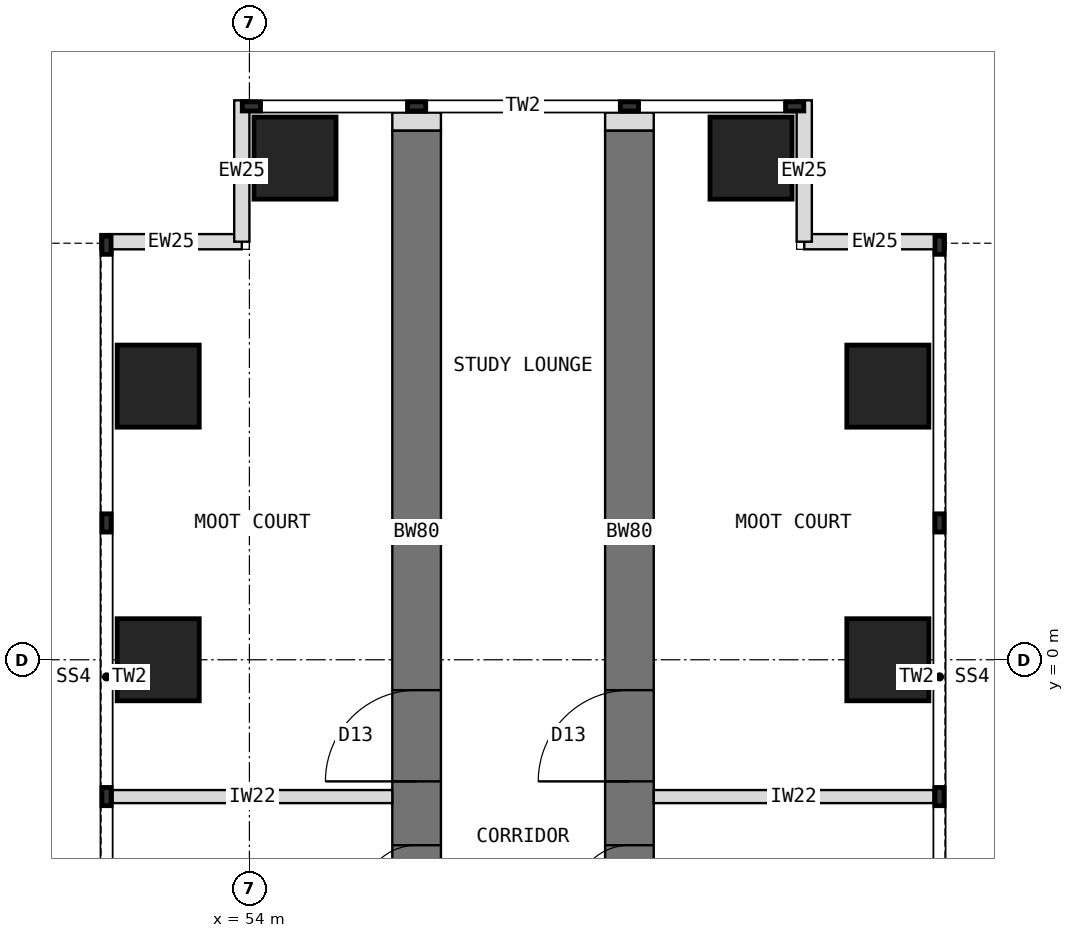
"""IFC4 building model, lengths in metres.
Left out: names, types, materials, properties, quantities, classifications, styles, units other than length and angle.
Written with IfcOpenShell. Run it as: python <this file> out.ifc"""

import sys

from ifc_helpers import new_model, si_unit, direction, frame, frame_2d, origin, origin_2d, place, context, subcontext, project, spatial, rectangle, extrude, element, fill, save


model = new_model("IFC4")
c1 = context("Model", 3, precision=1e-05, world=origin(), true_north=direction((0.0, 1.0)))
c2 = subcontext(c1, "Body", "Model", "MODEL_VIEW")
j1 = project(units=[si_unit("LENGTHUNIT", "METRE"), si_unit("PLANEANGLEUNIT", "RADIAN")], contexts=[c1])
p1 = place(None, origin())
s1 = spatial("IfcSite", under=j1, at=p1, CompositionType="ELEMENT")
p2 = place(p1, origin())
s2 = spatial("IfcBuilding", under=s1, at=p2, CompositionType="ELEMENT")
p3 = place(p2, frame((0.0, 0.0, 101.5)))
s3 = spatial("IfcBuildingStorey", under=s2, at=p3, CompositionType="ELEMENT", Elevation=101.5)
p4 = place(p3, frame((56.75, -4.5, 0.0), z_axis=(0.0, 0.0, 1.0), x_axis=(0.0, 1.0, 0.0)))
e1 = element("IfcWall", 1, at=p4, inside=s3, PredefinedType="SHEAR", context=c2, shape_type="SweptSolid", body=[
    extrude(rectangle(XDim=13.2, YDim=0.8, at=frame_2d((6.6, 0.0))), origin(), (0.0, 0.0, 1.0), 4.0),
])
p5 = place(p4, frame((0.55, 0.0, 0.0)))
e2 = element("IfcOpeningElement", 2, at=p5, cuts=e1, PredefinedType="OPENING", context=c2, shape_type="SweptSolid", body=[
    extrude(rectangle(XDim=0.9, YDim=2.1, at=frame_2d((0.45, 1.05))), frame((0.0, 0.41, 0.0), z_axis=(0.0, -1.0, 0.0), x_axis=(1.0, 0.0, 0.0)), (0.0, 0.0, 1.0), 0.82),
])
p6 = place(p4, frame((2.5, 0.0, 0.0)))
e3 = element("IfcOpeningElement", 3, at=p6, cuts=e1, PredefinedType="OPENING", context=c2, shape_type="SweptSolid", body=[
    extrude(rectangle(XDim=1.5, YDim=2.1, at=frame_2d((0.75, 1.05))), frame((0.0, 0.41, 0.0), z_axis=(0.0, -1.0, 0.0), x_axis=(1.0, 0.0, 0.0)), (0.0, 0.0, 1.0), 0.82),
])
p7 = place(p3, frame((60.25, -4.5, 0.0), z_axis=(0.0, 0.0, 1.0), x_axis=(0.0, 1.0, 0.0)))
e4 = element("IfcWall", 4, at=p7, inside=s3, PredefinedType="SHEAR", context=c2, shape_type="SweptSolid", body=[
    extrude(rectangle(XDim=13.2, YDim=0.8, at=frame_2d((6.6, 0.0))), origin(), (0.0, 0.0, 1.0), 4.0),
])
p8 = place(p7, frame((0.55, 0.0, 0.0)))
e5 = element("IfcOpeningElement", 5, at=p8, cuts=e4, PredefinedType="OPENING", context=c2, shape_type="SweptSolid", body=[
    extrude(rectangle(XDim=0.9, YDim=2.1, at=frame_2d((0.45, 1.05))), frame((0.0, 0.41, 0.0), z_axis=(0.0, -1.0, 0.0), x_axis=(1.0, 0.0, 0.0)), (0.0, 0.0, 1.0), 0.82),
])
p9 = place(p7, frame((2.5, 0.0, 0.0)))
e6 = element("IfcOpeningElement", 6, at=p9, cuts=e4, PredefinedType="OPENING", context=c2, shape_type="SweptSolid", body=[
    extrude(rectangle(XDim=1.5, YDim=2.1, at=frame_2d((0.75, 1.05))), frame((0.0, 0.41, 0.0), z_axis=(0.0, -1.0, 0.0), x_axis=(1.0, 0.0, 0.0)), (0.0, 0.0, 1.0), 0.82),
])
for number, where, z_axis, x_axis in (
    (7, (52.5, 0.0, 0.0), (0.0, 0.0, 1.0), (1.0, 0.0, 0.0)),
    (8, (64.5, 0.0, 0.0), (0.0, 0.0, 1.0), (1.0, 0.0, 0.0)),
    (9, (52.5, 4.5, 0.0), (0.0, 0.0, 1.0), (1.0, 0.0, 0.0)),
    (10, (64.5, 4.5, 0.0), (0.0, 0.0, 1.0), (1.0, 0.0, 0.0)),
    (11, (54.75, 8.25, 0.0), (0.0, 0.0, 1.0), (1.0, 0.0, 0.0)),
    (12, (62.25, 8.25, 0.0), (0.0, 0.0, 1.0), (1.0, 0.0, 0.0)),
):
    element("IfcColumn", number, at=place(p3, frame(where, z_axis=z_axis, x_axis=x_axis)), inside=s3, PredefinedType="COLUMN", context=c2, shape_type="SweptSolid", body=[
        extrude(rectangle(XDim=1.35, YDim=1.35, at=origin_2d()), origin(), (0.0, 0.0, 1.0), 4.0),
    ])
for number, where, z_axis, x_axis in (
    (13, (51.55, 6.875, 0.0), (0.0, 0.0, 1.0), (1.0, 0.0, 0.0)),
    (14, (53.875, 6.875, 0.0), (0.0, 0.0, 1.0), (0.0, 1.0, 0.0)),
    (15, (65.45, 6.875, 0.0), (0.0, 0.0, 1.0), (-1.0, 0.0, 0.0)),
    (16, (63.125, 6.875, 0.0), (0.0, 0.0, 1.0), (0.0, 1.0, 0.0)),
):
    element("IfcWall", number, at=place(p3, frame(where, z_axis=z_axis, x_axis=x_axis)), inside=s3, PredefinedType="STANDARD", context=c2, shape_type="SweptSolid", body=[
        extrude(rectangle(XDim=2.325, YDim=0.25, at=frame_2d((1.163, 0.0))), origin(), (0.0, 0.0, 1.0), 3.8),
    ])
for number, where, z_axis, x_axis in (
    (17, (56.75, 8.7, 0.0), (0.0, 0.0, 1.0), (0.0, 1.0, 0.0)),
    (18, (60.25, 8.7, 0.0), (0.0, 0.0, 1.0), (0.0, 1.0, 0.0)),
):
    element("IfcWall", number, at=place(p3, frame(where, z_axis=z_axis, x_axis=x_axis)), inside=s3, PredefinedType="PARTITIONING", context=c2, shape_type="SweptSolid", body=[
        extrude(rectangle(XDim=0.3, YDim=0.8, at=frame_2d((0.15, 0.0))), origin(), (0.0, 0.0, 1.0), 3.8),
    ])
for number, where, z_axis, x_axis in (
    (19, (56.35, -2.25, 0.0), (0.0, 0.0, 1.0), (-1.0, 0.0, 0.0)),
    (20, (60.65, -2.25, 0.0), (0.0, 0.0, 1.0), (1.0, 0.0, 0.0)),
):
    element("IfcWall", number, at=place(p3, frame(where, z_axis=z_axis, x_axis=x_axis)), inside=s3, PredefinedType="PARTITIONING", context=c2, shape_type="SweptSolid", body=[
        extrude(rectangle(XDim=4.6, YDim=0.215, at=frame_2d((2.3, 0.0))), origin(), (0.0, 0.0, 1.0), 3.8),
    ])
p10 = place(p5, origin())
e21 = element("IfcDoor", 21, at=p10, inside=s3, OperationType="SINGLE_SWING_LEFT", PredefinedType="DOOR", context=c2, shape_type="SweptSolid", body=[
    extrude(rectangle(XDim=0.82, YDim=2.06, at=frame_2d((0.45, 1.03))), frame((0.0, 0.025, 0.0), z_axis=(0.0, -1.0, 0.0), x_axis=(1.0, 0.0, 0.0)), (0.0, 0.0, 1.0), 0.05),
    extrude(rectangle(XDim=0.04, YDim=2.1, at=frame_2d((0.02, 1.05))), frame((0.0, 0.4, 0.0), z_axis=(0.0, -1.0, 0.0), x_axis=(1.0, 0.0, 0.0)), (0.0, 0.0, 1.0), 0.8),
    extrude(rectangle(XDim=0.04, YDim=2.1, at=frame_2d((0.88, 1.05))), frame((0.0, 0.4, 0.0), z_axis=(0.0, -1.0, 0.0), x_axis=(1.0, 0.0, 0.0)), (0.0, 0.0, 1.0), 0.8),
    extrude(rectangle(XDim=0.82, YDim=0.04, at=frame_2d((0.45, 2.08))), frame((0.0, 0.4, 0.0), z_axis=(0.0, -1.0, 0.0), x_axis=(1.0, 0.0, 0.0)), (0.0, 0.0, 1.0), 0.8),
])
fill(e2, e21)
p11 = place(p6, origin())
e22 = element("IfcDoor", 22, at=p11, inside=s3, OperationType="DOUBLE_DOOR_SINGLE_SWING", PredefinedType="DOOR", context=c2, shape_type="SweptSolid", body=[
    extrude(rectangle(XDim=1.42, YDim=2.06, at=frame_2d((0.75, 1.03))), frame((0.0, 0.025, 0.0), z_axis=(0.0, -1.0, 0.0), x_axis=(1.0, 0.0, 0.0)), (0.0, 0.0, 1.0), 0.05),
    extrude(rectangle(XDim=0.04, YDim=2.1, at=frame_2d((0.02, 1.05))), frame((0.0, 0.4, 0.0), z_axis=(0.0, -1.0, 0.0), x_axis=(1.0, 0.0, 0.0)), (0.0, 0.0, 1.0), 0.8),
    extrude(rectangle(XDim=0.04, YDim=2.1, at=frame_2d((1.48, 1.05))), frame((0.0, 0.4, 0.0), z_axis=(0.0, -1.0, 0.0), x_axis=(1.0, 0.0, 0.0)), (0.0, 0.0, 1.0), 0.8),
    extrude(rectangle(XDim=1.42, YDim=0.04, at=frame_2d((0.75, 2.08))), frame((0.0, 0.4, 0.0), z_axis=(0.0, -1.0, 0.0), x_axis=(1.0, 0.0, 0.0)), (0.0, 0.0, 1.0), 0.8),
])
fill(e3, e22)
p12 = place(p8, origin())
e23 = element("IfcDoor", 23, at=p12, inside=s3, OperationType="SINGLE_SWING_LEFT", PredefinedType="DOOR", context=c2, shape_type="SweptSolid", body=[
    extrude(rectangle(XDim=0.82, YDim=2.06, at=frame_2d((0.45, 1.03))), frame((0.0, 0.025, 0.0), z_axis=(0.0, -1.0, 0.0), x_axis=(1.0, 0.0, 0.0)), (0.0, 0.0, 1.0), 0.05),
    extrude(rectangle(XDim=0.04, YDim=2.1, at=frame_2d((0.02, 1.05))), frame((0.0, 0.4, 0.0), z_axis=(0.0, -1.0, 0.0), x_axis=(1.0, 0.0, 0.0)), (0.0, 0.0, 1.0), 0.8),
    extrude(rectangle(XDim=0.04, YDim=2.1, at=frame_2d((0.88, 1.05))), frame((0.0, 0.4, 0.0), z_axis=(0.0, -1.0, 0.0), x_axis=(1.0, 0.0, 0.0)), (0.0, 0.0, 1.0), 0.8),
    extrude(rectangle(XDim=0.82, YDim=0.04, at=frame_2d((0.45, 2.08))), frame((0.0, 0.4, 0.0), z_axis=(0.0, -1.0, 0.0), x_axis=(1.0, 0.0, 0.0)), (0.0, 0.0, 1.0), 0.8),
])
fill(e5, e23)
p13 = place(p9, origin())
e24 = element("IfcDoor", 24, at=p13, inside=s3, OperationType="DOUBLE_DOOR_SINGLE_SWING", PredefinedType="DOOR", context=c2, shape_type="SweptSolid", body=[
    extrude(rectangle(XDim=1.42, YDim=2.06, at=frame_2d((0.75, 1.03))), frame((0.0, 0.025, 0.0), z_axis=(0.0, -1.0, 0.0), x_axis=(1.0, 0.0, 0.0)), (0.0, 0.0, 1.0), 0.05),
    extrude(rectangle(XDim=0.04, YDim=2.1, at=frame_2d((0.02, 1.05))), frame((0.0, 0.4, 0.0), z_axis=(0.0, -1.0, 0.0), x_axis=(1.0, 0.0, 0.0)), (0.0, 0.0, 1.0), 0.8),
    extrude(rectangle(XDim=0.04, YDim=2.1, at=frame_2d((1.48, 1.05))), frame((0.0, 0.4, 0.0), z_axis=(0.0, -1.0, 0.0), x_axis=(1.0, 0.0, 0.0)), (0.0, 0.0, 1.0), 0.8),
    extrude(rectangle(XDim=1.42, YDim=0.04, at=frame_2d((0.75, 2.08))), frame((0.0, 0.4, 0.0), z_axis=(0.0, -1.0, 0.0), x_axis=(1.0, 0.0, 0.0)), (0.0, 0.0, 1.0), 0.8),
])
fill(e6, e24)
save(model, sys.argv[1])
